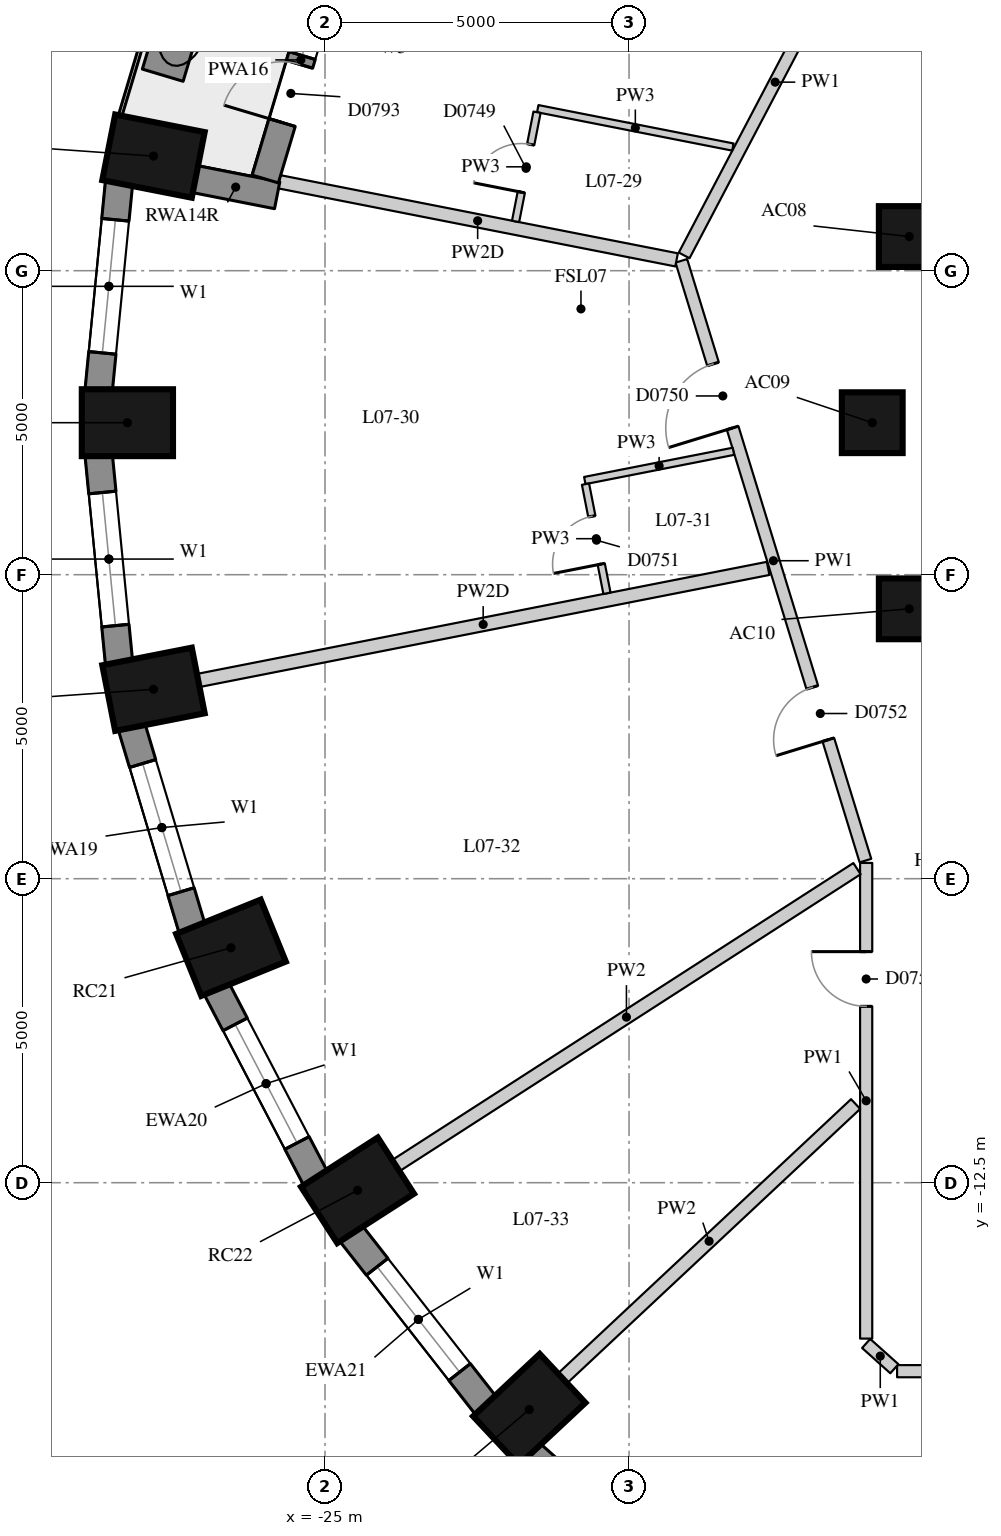
"""IFC4 building model, lengths in metres.
Left out: names, types, materials, properties, quantities, classifications, styles, units other than length and angle.
Written with IfcOpenShell. Run it as: python <this file> out.ifc"""

import sys

from ifc_helpers import new_model, si_unit, direction, frame, frame_2d, origin, origin_2d, place, context, subcontext, project, spatial, rectangle, extrude, element, fill, save


model = new_model("IFC4")
c1 = context("Model", 3, precision=1e-05, world=origin(), true_north=direction((0.0, 1.0)))
c2 = subcontext(c1, "Body", "Model", "MODEL_VIEW")
j1 = project(units=[si_unit("LENGTHUNIT", "METRE"), si_unit("PLANEANGLEUNIT", "RADIAN")], contexts=[c1])
p1 = place(None, origin())
s1 = spatial("IfcSite", under=j1, at=p1, CompositionType="ELEMENT")
p2 = place(p1, origin())
s2 = spatial("IfcBuilding", under=s1, at=p2, CompositionType="ELEMENT")
p3 = place(p2, frame((0.0, 0.0, 31.6)))
s3 = spatial("IfcBuildingStorey", under=s2, at=p3, CompositionType="ELEMENT", Elevation=31.6)
for number, where, z_axis, x_axis in (
    (1, (-27.821, 4.385, 0.0), (0.0, 0.0, 1.0), (-0.981, 0.193, 0.0)),
    (2, (-28.25, 0.0, 0.0), (0.0, 0.0, 1.0), (-1.0, 0.0, 0.0)),
    (3, (-27.821, -4.385, 0.0), (0.0, 0.0, 1.0), (-0.981, -0.193, 0.0)),
    (4, (-26.546, -8.636, 0.0), (0.0, 0.0, 1.0), (-0.927, -0.376, 0.0)),
    (5, (-24.465, -12.625, 0.0), (0.0, 0.0, 1.0), (-0.841, -0.541, 0.0)),
    (6, (-21.641, -16.23, 0.0), (0.0, 0.0, 1.0), (-0.73, -0.683, 0.0)),
):
    element("IfcColumn", number, at=place(p3, frame(where, z_axis=z_axis, x_axis=x_axis)), inside=s3, PredefinedType="COLUMN", context=c2, shape_type="SweptSolid", body=[
        extrude(rectangle(XDim=1.5, YDim=1.1, at=origin_2d()), origin(), (0.0, 0.0, 1.0), 3.3),
    ])
for number, where, z_axis, x_axis in (
    (7, (-15.391, 3.062, 0.0), (0.0, 0.0, 1.0), (1.0, 0.0, 0.0)),
    (8, (-16.0, 0.0, 0.0), (0.0, 0.0, 1.0), (1.0, 0.0, 0.0)),
    (9, (-15.391, -3.062, 0.0), (0.0, 0.0, 1.0), (1.0, 0.0, 0.0)),
):
    element("IfcColumn", number, at=place(p3, frame(where, z_axis=z_axis, x_axis=x_axis)), inside=s3, PredefinedType="COLUMN", context=c2, shape_type="SweptSolid", body=[
        extrude(rectangle(XDim=1.0, YDim=1.0, at=origin_2d()), origin(), (0.0, 0.0, 1.0), 3.3),
    ])
p4 = place(p3, frame((-28.387, 3.956, 0.0), z_axis=(0.0, 0.0, 1.0), x_axis=(-0.097389581596, -0.995246336038, 0.0)))
e10 = element("IfcWall", 10, at=p4, inside=s3, PredefinedType="SOLIDWALL", context=c2, shape_type="SweptSolid", body=[
    extrude(rectangle(XDim=3.442, YDim=0.45, at=frame_2d((1.721, 0.0))), origin(), (0.0, 0.0, 1.0), 3.02),
])
p5 = place(p4, frame((0.621, 0.0, 0.4)))
e11 = element("IfcOpeningElement", 11, at=p5, cuts=e10, PredefinedType="OPENING", context=c2, shape_type="SweptSolid", body=[
    extrude(rectangle(XDim=2.2, YDim=1.75, at=frame_2d((1.1, 0.875))), frame((0.0, 0.235, 0.0), z_axis=(0.0, -1.0, 0.0), x_axis=(1.0, 0.0, 0.0)), (0.0, 0.0, 1.0), 0.47),
])
p6 = place(p3, frame((-28.722, -0.53, 0.0), z_axis=(0.0, 0.0, 1.0), x_axis=(0.097389581596, -0.995246336038, 0.0)))
e12 = element("IfcWall", 12, at=p6, inside=s3, PredefinedType="SOLIDWALL", context=c2, shape_type="SweptSolid", body=[
    extrude(rectangle(XDim=3.442, YDim=0.45, at=frame_2d((1.721, 0.0))), origin(), (0.0, 0.0, 1.0), 3.02),
])
p7 = place(p6, frame((0.621, 0.0, 0.4)))
e13 = element("IfcOpeningElement", 13, at=p7, cuts=e12, PredefinedType="OPENING", context=c2, shape_type="SweptSolid", body=[
    extrude(rectangle(XDim=2.2, YDim=1.75, at=frame_2d((1.1, 0.875))), frame((0.0, 0.235, 0.0), z_axis=(0.0, -1.0, 0.0), x_axis=(1.0, 0.0, 0.0)), (0.0, 0.0, 1.0), 0.47),
])
p8 = place(p3, frame((-28.182, -4.996, 0.0), z_axis=(0.0, 0.0, 1.0), x_axis=(0.287064133733, -0.957911364963, 0.0)))
e14 = element("IfcWall", 14, at=p8, inside=s3, PredefinedType="SOLIDWALL", context=c2, shape_type="SweptSolid", body=[
    extrude(rectangle(XDim=3.473, YDim=0.45, at=frame_2d((1.737, 0.0))), origin(), (0.0, 0.0, 1.0), 3.02),
])
p9 = place(p8, frame((0.637, 0.0, 0.4)))
e15 = element("IfcOpeningElement", 15, at=p9, cuts=e14, PredefinedType="OPENING", context=c2, shape_type="SweptSolid", body=[
    extrude(rectangle(XDim=2.2, YDim=1.75, at=frame_2d((1.1, 0.875))), frame((0.0, 0.235, 0.0), z_axis=(0.0, -1.0, 0.0), x_axis=(1.0, 0.0, 0.0)), (0.0, 0.0, 1.0), 0.47),
])
p10 = place(p3, frame((-26.786, -9.305, 0.0), z_axis=(0.0, 0.0, 1.0), x_axis=(0.462492775226, -0.886623050041, 0.0)))
e16 = element("IfcWall", 16, at=p10, inside=s3, PredefinedType="SOLIDWALL", context=c2, shape_type="SweptSolid", body=[
    extrude(rectangle(XDim=3.532, YDim=0.45, at=frame_2d((1.766, 0.0))), origin(), (0.0, 0.0, 1.0), 3.02),
])
p11 = place(p10, frame((0.666, 0.0, 0.4)))
e17 = element("IfcOpeningElement", 17, at=p11, cuts=e16, PredefinedType="OPENING", context=c2, shape_type="SweptSolid", body=[
    extrude(rectangle(XDim=2.2, YDim=1.75, at=frame_2d((1.1, 0.875))), frame((0.0, 0.235, 0.0), z_axis=(0.0, -1.0, 0.0), x_axis=(1.0, 0.0, 0.0)), (0.0, 0.0, 1.0), 0.47),
])
p12 = place(p3, frame((-24.578, -13.328, 0.0), z_axis=(0.0, 0.0, 1.0), x_axis=(0.616661975264, -0.787228053529, 0.0)))
e18 = element("IfcWall", 18, at=p12, inside=s3, PredefinedType="SOLIDWALL", context=c2, shape_type="SweptSolid", body=[
    extrude(rectangle(XDim=3.61, YDim=0.45, at=frame_2d((1.805, 0.0))), origin(), (0.0, 0.0, 1.0), 3.02),
])
p13 = place(p12, frame((0.705, 0.0, 0.4)))
e19 = element("IfcOpeningElement", 19, at=p13, cuts=e18, PredefinedType="OPENING", context=c2, shape_type="SweptSolid", body=[
    extrude(rectangle(XDim=2.2, YDim=1.75, at=frame_2d((1.1, 0.875))), frame((0.0, 0.235, 0.0), z_axis=(0.0, -1.0, 0.0), x_axis=(1.0, 0.0, 0.0)), (0.0, 0.0, 1.0), 0.47),
])
p14 = place(p3, frame((-21.627, -16.943, 0.0), z_axis=(0.0, 0.0, 1.0), x_axis=(0.745526233716, -0.66647628228, 0.0)))
e20 = element("IfcWall", 20, at=p14, inside=s3, PredefinedType="SOLIDWALL", context=c2, shape_type="SweptSolid", body=[
    extrude(rectangle(XDim=3.697, YDim=0.45, at=frame_2d((1.848, 0.0))), origin(), (0.0, 0.0, 1.0), 3.02),
])
p15 = place(p14, frame((0.749, 0.0, 0.4)))
e21 = element("IfcOpeningElement", 21, at=p15, cuts=e20, PredefinedType="OPENING", context=c2, shape_type="SweptSolid", body=[
    extrude(rectangle(XDim=2.2, YDim=1.75, at=frame_2d((1.1, 0.875))), frame((0.0, 0.235, 0.0), z_axis=(0.0, -1.0, 0.0), x_axis=(1.0, 0.0, 0.0)), (0.0, 0.0, 1.0), 0.47),
])
p16 = place(p3, frame((-27.151, 4.009, 0.0), z_axis=(0.0, 0.0, 1.0), x_axis=(0.981197182729, -0.1930080014, 0.0)))
e22 = element("IfcWall", 22, at=p16, inside=s3, PredefinedType="SOLIDWALL", context=c2, shape_type="SweptSolid", body=[
    extrude(rectangle(XDim=1.39, YDim=0.45, at=frame_2d((0.695, 0.0))), origin(), (0.0, 0.0, 1.0), 2.47),
])
p17 = place(p3, frame((-24.812, 7.925, 0.0), z_axis=(0.0, 0.0, 1.0), x_axis=(-0.286389028326, -0.95811341941, 0.0)))
e23 = element("IfcWall", 23, at=p17, inside=s3, PredefinedType="SOLIDWALL", context=c2, shape_type="SweptSolid", body=[
    extrude(rectangle(XDim=4.088, YDim=0.45, at=frame_2d((2.044, 0.0))), origin(), (0.0, 0.0, 1.0), 3.02),
])
p18 = place(p17, frame((0.969, 0.0, 0.4)))
e24 = element("IfcOpeningElement", 24, at=p18, cuts=e23, PredefinedType="OPENING", context=c2, shape_type="SweptSolid", body=[
    extrude(rectangle(XDim=1.0, YDim=1.75, at=frame_2d((0.5, 0.875))), frame((0.0, 0.235, 0.0), z_axis=(0.0, -1.0, 0.0), x_axis=(1.0, 0.0, 0.0)), (0.0, 0.0, 1.0), 0.47),
])
p19 = place(p17, frame((2.119, 0.0, 0.0)))
e25 = element("IfcOpeningElement", 25, at=p19, cuts=e23, PredefinedType="OPENING", context=c2, shape_type="SweptSolid", body=[
    extrude(rectangle(XDim=1.0, YDim=2.15, at=frame_2d((0.5, 1.075))), frame((0.0, 0.235, 0.0), z_axis=(0.0, -1.0, 0.0), x_axis=(1.0, 0.0, 0.0)), (0.0, 0.0, 1.0), 0.47),
])
p20 = place(p3, frame((-27.152, 7.439, 0.0), z_axis=(0.0, 0.0, 1.0), x_axis=(-0.287024312863, -0.957923297465, 0.0)))
e26 = element("IfcWall", 26, at=p20, inside=s3, PredefinedType="USERDEFINED", context=c2, shape_type="SweptSolid", body=[
    extrude(rectangle(XDim=1.8, YDim=0.7, at=frame_2d((0.9, 0.0))), origin(), (0.0, 0.0, 1.0), 0.75),
])
p21 = place(p3, frame((-8.0, -15.6, 0.0), z_axis=(0.0, 0.0, 1.0), x_axis=(-1.0, 0.0, 0.0)))
e27 = element("IfcWall", 27, at=p21, inside=s3, PredefinedType="PARTITIONING", context=c2, shape_type="SweptSolid", body=[
    extrude(rectangle(XDim=7.592, YDim=0.2, at=frame_2d((3.796, 0.0))), origin(), (0.0, 0.0, 1.0), 3.02),
])
p22 = place(p21, frame((2.896, 0.0, 0.0)))
e28 = element("IfcOpeningElement", 28, at=p22, cuts=e27, PredefinedType="OPENING", context=c2, shape_type="SweptSolid", body=[
    extrude(rectangle(XDim=1.8, YDim=2.1, at=frame_2d((0.9, 1.05))), frame((0.0, 0.11, 0.0), z_axis=(0.0, -1.0, 0.0), x_axis=(1.0, 0.0, 0.0)), (0.0, 0.0, 1.0), 0.22),
])
p23 = place(p3, frame((-15.636, -15.56, 0.0), z_axis=(0.0, 0.0, 1.0), x_axis=(-0.744656758283, 0.667447610187, 0.0)))
e29 = element("IfcWall", 29, at=p23, inside=s3, PredefinedType="PARTITIONING", context=c2, shape_type="SweptSolid", body=[
    extrude(rectangle(XDim=0.623, YDim=0.2, at=frame_2d((0.312, 0.0))), origin(), (0.0, 0.0, 1.0), 3.02),
])
p24 = place(p3, frame((-16.1, -15.064, 0.0), z_axis=(0.0, 0.0, 1.0), x_axis=(0.0, 1.0, 0.0)))
e30 = element("IfcWall", 30, at=p24, inside=s3, PredefinedType="PARTITIONING", context=c2, shape_type="SweptSolid", body=[
    extrude(rectangle(XDim=7.823, YDim=0.2, at=frame_2d((3.912, 0.0))), origin(), (0.0, 0.0, 1.0), 3.02),
])
p25 = place(p24, frame((5.464, 0.0, 0.0)))
e31 = element("IfcOpeningElement", 31, at=p25, cuts=e30, PredefinedType="OPENING", context=c2, shape_type="SweptSolid", body=[
    extrude(rectangle(XDim=0.9, YDim=2.1, at=frame_2d((0.45, 1.05))), frame((0.0, 0.11, 0.0), z_axis=(0.0, -1.0, 0.0), x_axis=(1.0, 0.0, 0.0)), (0.0, 0.0, 1.0), 0.22),
])
p26 = place(p3, frame((-16.112, -7.203, 0.0), z_axis=(0.0, 0.0, 1.0), x_axis=(-0.293439067289, 0.95597777892, 0.0)))
e32 = element("IfcWall", 32, at=p26, inside=s3, PredefinedType="PARTITIONING", context=c2, shape_type="SweptSolid", body=[
    extrude(rectangle(XDim=10.319, YDim=0.2, at=frame_2d((5.16, 0.0))), origin(), (0.0, 0.0, 1.0), 3.02),
])
p27 = place(p26, frame((7.444, 0.0, 0.0)))
e33 = element("IfcOpeningElement", 33, at=p27, cuts=e32, PredefinedType="OPENING", context=c2, shape_type="SweptSolid", body=[
    extrude(rectangle(XDim=1.1, YDim=2.1, at=frame_2d((0.55, 1.05))), frame((0.0, 0.11, 0.0), z_axis=(0.0, -1.0, 0.0), x_axis=(1.0, 0.0, 0.0)), (0.0, 0.0, 1.0), 0.22),
])
p28 = place(p26, frame((2.081, 0.0, 0.0)))
e34 = element("IfcOpeningElement", 34, at=p28, cuts=e32, PredefinedType="OPENING", context=c2, shape_type="SweptSolid", body=[
    extrude(rectangle(XDim=0.9, YDim=2.1, at=frame_2d((0.45, 1.05))), frame((0.0, 0.11, 0.0), z_axis=(0.0, -1.0, 0.0), x_axis=(1.0, 0.0, 0.0)), (0.0, 0.0, 1.0), 0.22),
])
p29 = place(p3, frame((-19.094, 2.751, 0.0), z_axis=(0.0, 0.0, 1.0), x_axis=(0.464994434802, 0.88531360297, 0.0)))
e35 = element("IfcWall", 35, at=p29, inside=s3, PredefinedType="PARTITIONING", context=c2, shape_type="SweptSolid", body=[
    extrude(rectangle(XDim=6.438, YDim=0.2, at=frame_2d((3.219, 0.0))), origin(), (0.0, 0.0, 1.0), 3.02),
])
p30 = place(p3, frame((-25.761, 3.964, 0.0), z_axis=(0.0, 0.0, 1.0), x_axis=(0.981216162043, -0.192911490963, 0.0)))
e36 = element("IfcWall", 36, at=p30, inside=s3, PredefinedType="PARTITIONING", context=c2, shape_type="SweptSolid", body=[
    extrude(rectangle(XDim=6.668, YDim=0.22, at=frame_2d((3.334, 0.0))), origin(), (0.0, 0.0, 1.0), 2.47),
])
p31 = place(p3, frame((-27.085, -4.24, 0.0), z_axis=(0.0, 0.0, 1.0), x_axis=(0.981199931552, 0.192994026651, 0.0)))
e37 = element("IfcWall", 37, at=p31, inside=s3, PredefinedType="PARTITIONING", context=c2, shape_type="SweptSolid", body=[
    extrude(rectangle(XDim=9.552, YDim=0.22, at=frame_2d((4.776, 0.0))), origin(), (0.0, 0.0, 1.0), 2.47),
])
p32 = place(p3, frame((-23.835, -12.219, 0.0), z_axis=(0.0, 0.0, 1.0), x_axis=(0.840731477632, 0.541452290159, 0.0)))
e38 = element("IfcWall", 38, at=p32, inside=s3, PredefinedType="PARTITIONING", context=c2, shape_type="SweptSolid", body=[
    extrude(rectangle(XDim=9.021, YDim=0.22, at=frame_2d((4.51, 0.0))), origin(), (0.0, 0.0, 1.0), 3.02),
])
p33 = place(p3, frame((-21.093, -15.718, 0.0), z_axis=(0.0, 0.0, 1.0), x_axis=(0.73009284205, 0.683347965525, 0.0)))
e39 = element("IfcWall", 39, at=p33, inside=s3, PredefinedType="PARTITIONING", context=c2, shape_type="SweptSolid", body=[
    extrude(rectangle(XDim=6.602, YDim=0.22, at=frame_2d((3.301, 0.0))), origin(), (0.0, 0.0, 1.0), 3.02),
])
p34 = place(p3, frame((-18.292, 4.534, 0.0), z_axis=(0.0, 0.0, 1.0), x_axis=(-0.981198627208, 0.193000657942, 0.0)))
e40 = element("IfcWall", 40, at=p34, inside=s3, PredefinedType="PARTITIONING", context=c2, shape_type="SweptSolid", body=[
    extrude(rectangle(XDim=3.271, YDim=0.12, at=frame_2d((1.636, 0.0))), origin(), (0.0, 0.0, 1.0), 3.02),
])
p35 = place(p3, frame((-18.283, -0.47, 0.0), z_axis=(0.0, 0.0, 1.0), x_axis=(-0.981208753495, -0.192949169643, 0.0)))
e41 = element("IfcWall", 41, at=p35, inside=s3, PredefinedType="PARTITIONING", context=c2, shape_type="SweptSolid", body=[
    extrude(rectangle(XDim=2.491, YDim=0.12, at=frame_2d((1.246, 0.0))), origin(), (0.0, 0.0, 1.0), 3.02),
])
p36 = place(p3, frame((-21.513, 5.106, 0.0), z_axis=(0.0, 0.0, 1.0), x_axis=(-0.19288291118, -0.981221780524, 0.0)))
e42 = element("IfcWall", 42, at=p36, inside=s3, PredefinedType="PARTITIONING", context=c2, shape_type="SweptSolid", body=[
    extrude(rectangle(XDim=1.83, YDim=0.12, at=frame_2d((0.915, 0.0))), origin(), (0.0, 0.0, 1.0), 3.02),
])
p37 = place(p36, frame((0.54, 0.0, 0.0)))
e43 = element("IfcOpeningElement", 43, at=p37, cuts=e42, PredefinedType="OPENING", context=c2, shape_type="SweptSolid", body=[
    extrude(rectangle(XDim=0.8, YDim=2.1, at=frame_2d((0.4, 1.05))), frame((0.0, 0.07, 0.0), z_axis=(0.0, -1.0, 0.0), x_axis=(1.0, 0.0, 0.0)), (0.0, 0.0, 1.0), 0.14),
])
p38 = place(p3, frame((-20.716, -1.01, 0.0), z_axis=(0.0, 0.0, 1.0), x_axis=(0.193036598643, -0.981191557029, 0.0)))
e44 = element("IfcWall", 44, at=p38, inside=s3, PredefinedType="PARTITIONING", context=c2, shape_type="SweptSolid", body=[
    extrude(rectangle(XDim=1.83, YDim=0.12, at=frame_2d((0.915, 0.0))), origin(), (0.0, 0.0, 1.0), 3.02),
])
p39 = place(p38, frame((0.54, 0.0, 0.0)))
e45 = element("IfcOpeningElement", 45, at=p39, cuts=e44, PredefinedType="OPENING", context=c2, shape_type="SweptSolid", body=[
    extrude(rectangle(XDim=0.8, YDim=2.1, at=frame_2d((0.4, 1.05))), frame((0.0, 0.07, 0.0), z_axis=(0.0, -1.0, 0.0), x_axis=(1.0, 0.0, 0.0)), (0.0, 0.0, 1.0), 0.14),
])
p40 = place(p5, origin())
e46 = element("IfcWindow", 46, at=p40, inside=s3, PartitioningType="SINGLE_PANEL", PredefinedType="WINDOW", context=c2, shape_type="SweptSolid", body=[
    extrude(rectangle(XDim=2.2, YDim=1.75, at=frame_2d((1.1, 0.875))), frame((0.0, 0.035, 0.0), z_axis=(0.0, -1.0, 0.0), x_axis=(1.0, 0.0, 0.0)), (0.0, 0.0, 1.0), 0.06),
])
fill(e11, e46)
p41 = place(p7, origin())
e47 = element("IfcWindow", 47, at=p41, inside=s3, PartitioningType="SINGLE_PANEL", PredefinedType="WINDOW", context=c2, shape_type="SweptSolid", body=[
    extrude(rectangle(XDim=2.2, YDim=1.75, at=frame_2d((1.1, 0.875))), frame((0.0, 0.035, 0.0), z_axis=(0.0, -1.0, 0.0), x_axis=(1.0, 0.0, 0.0)), (0.0, 0.0, 1.0), 0.06),
])
fill(e13, e47)
p42 = place(p9, origin())
e48 = element("IfcWindow", 48, at=p42, inside=s3, PartitioningType="SINGLE_PANEL", PredefinedType="WINDOW", context=c2, shape_type="SweptSolid", body=[
    extrude(rectangle(XDim=2.2, YDim=1.75, at=frame_2d((1.1, 0.875))), frame((0.0, 0.035, 0.0), z_axis=(0.0, -1.0, 0.0), x_axis=(1.0, 0.0, 0.0)), (0.0, 0.0, 1.0), 0.06),
])
fill(e15, e48)
p43 = place(p11, origin())
e49 = element("IfcWindow", 49, at=p43, inside=s3, PartitioningType="SINGLE_PANEL", PredefinedType="WINDOW", context=c2, shape_type="SweptSolid", body=[
    extrude(rectangle(XDim=2.2, YDim=1.75, at=frame_2d((1.1, 0.875))), frame((0.0, 0.035, 0.0), z_axis=(0.0, -1.0, 0.0), x_axis=(1.0, 0.0, 0.0)), (0.0, 0.0, 1.0), 0.06),
])
fill(e17, e49)
p44 = place(p13, origin())
e50 = element("IfcWindow", 50, at=p44, inside=s3, PartitioningType="SINGLE_PANEL", PredefinedType="WINDOW", context=c2, shape_type="SweptSolid", body=[
    extrude(rectangle(XDim=2.2, YDim=1.75, at=frame_2d((1.1, 0.875))), frame((0.0, 0.035, 0.0), z_axis=(0.0, -1.0, 0.0), x_axis=(1.0, 0.0, 0.0)), (0.0, 0.0, 1.0), 0.06),
])
fill(e19, e50)
p45 = place(p18, origin())
e51 = element("IfcWindow", 51, at=p45, inside=s3, PartitioningType="SINGLE_PANEL", PredefinedType="WINDOW", context=c2, shape_type="SweptSolid", body=[
    extrude(rectangle(XDim=1.0, YDim=1.75, at=frame_2d((0.5, 0.875))), frame((0.0, 0.035, 0.0), z_axis=(0.0, -1.0, 0.0), x_axis=(1.0, 0.0, 0.0)), (0.0, 0.0, 1.0), 0.06),
])
fill(e24, e51)
p46 = place(p19, frame((1.0, 0.0, 0.0), z_axis=(0.0, 0.0, 1.0), x_axis=(-1.0, 0.0, 0.0)))
e52 = element("IfcDoor", 52, at=p46, inside=s3, OperationType="SINGLE_SWING_LEFT", PredefinedType="DOOR", context=c2, shape_type="SweptSolid", body=[
    extrude(rectangle(XDim=1.0, YDim=2.15, at=frame_2d((0.5, 1.075))), frame((0.0, 0.075, 0.0), z_axis=(0.0, -1.0, 0.0), x_axis=(1.0, 0.0, 0.0)), (0.0, 0.0, 1.0), 0.05),
])
fill(e25, e52)
p47 = place(p37, origin())
e53 = element("IfcDoor", 53, at=p47, inside=s3, OperationType="SINGLE_SWING_LEFT", PredefinedType="DOOR", context=c2, shape_type="SweptSolid", body=[
    extrude(rectangle(XDim=0.8, YDim=2.1, at=frame_2d((0.4, 1.05))), frame((0.0, 0.025, 0.0), z_axis=(0.0, -1.0, 0.0), x_axis=(1.0, 0.0, 0.0)), (0.0, 0.0, 1.0), 0.05),
])
fill(e43, e53)
p48 = place(p27, origin())
e54 = element("IfcDoor", 54, at=p48, inside=s3, OperationType="SINGLE_SWING_LEFT", PredefinedType="DOOR", context=c2, shape_type="SweptSolid", body=[
    extrude(rectangle(XDim=1.1, YDim=2.1, at=frame_2d((0.55, 1.05))), frame((0.0, 0.025, 0.0), z_axis=(0.0, -1.0, 0.0), x_axis=(1.0, 0.0, 0.0)), (0.0, 0.0, 1.0), 0.05),
])
fill(e33, e54)
p49 = place(p39, origin())
e55 = element("IfcDoor", 55, at=p49, inside=s3, OperationType="SINGLE_SWING_LEFT", PredefinedType="DOOR", context=c2, shape_type="SweptSolid", body=[
    extrude(rectangle(XDim=0.8, YDim=2.1, at=frame_2d((0.4, 1.05))), frame((0.0, 0.025, 0.0), z_axis=(0.0, -1.0, 0.0), x_axis=(1.0, 0.0, 0.0)), (0.0, 0.0, 1.0), 0.05),
])
fill(e45, e55)
p50 = place(p28, origin())
e56 = element("IfcDoor", 56, at=p50, inside=s3, OperationType="SINGLE_SWING_LEFT", PredefinedType="DOOR", context=c2, shape_type="SweptSolid", body=[
    extrude(rectangle(XDim=0.9, YDim=2.1, at=frame_2d((0.45, 1.05))), frame((0.0, 0.025, 0.0), z_axis=(0.0, -1.0, 0.0), x_axis=(1.0, 0.0, 0.0)), (0.0, 0.0, 1.0), 0.05),
])
fill(e34, e56)
p51 = place(p25, origin())
e57 = element("IfcDoor", 57, at=p51, inside=s3, OperationType="SINGLE_SWING_RIGHT", PredefinedType="DOOR", context=c2, shape_type="SweptSolid", body=[
    extrude(rectangle(XDim=0.9, YDim=2.1, at=frame_2d((0.45, 1.05))), frame((0.0, 0.025, 0.0), z_axis=(0.0, -1.0, 0.0), x_axis=(1.0, 0.0, 0.0)), (0.0, 0.0, 1.0), 0.05),
])
fill(e31, e57)
save(model, sys.argv[1])
